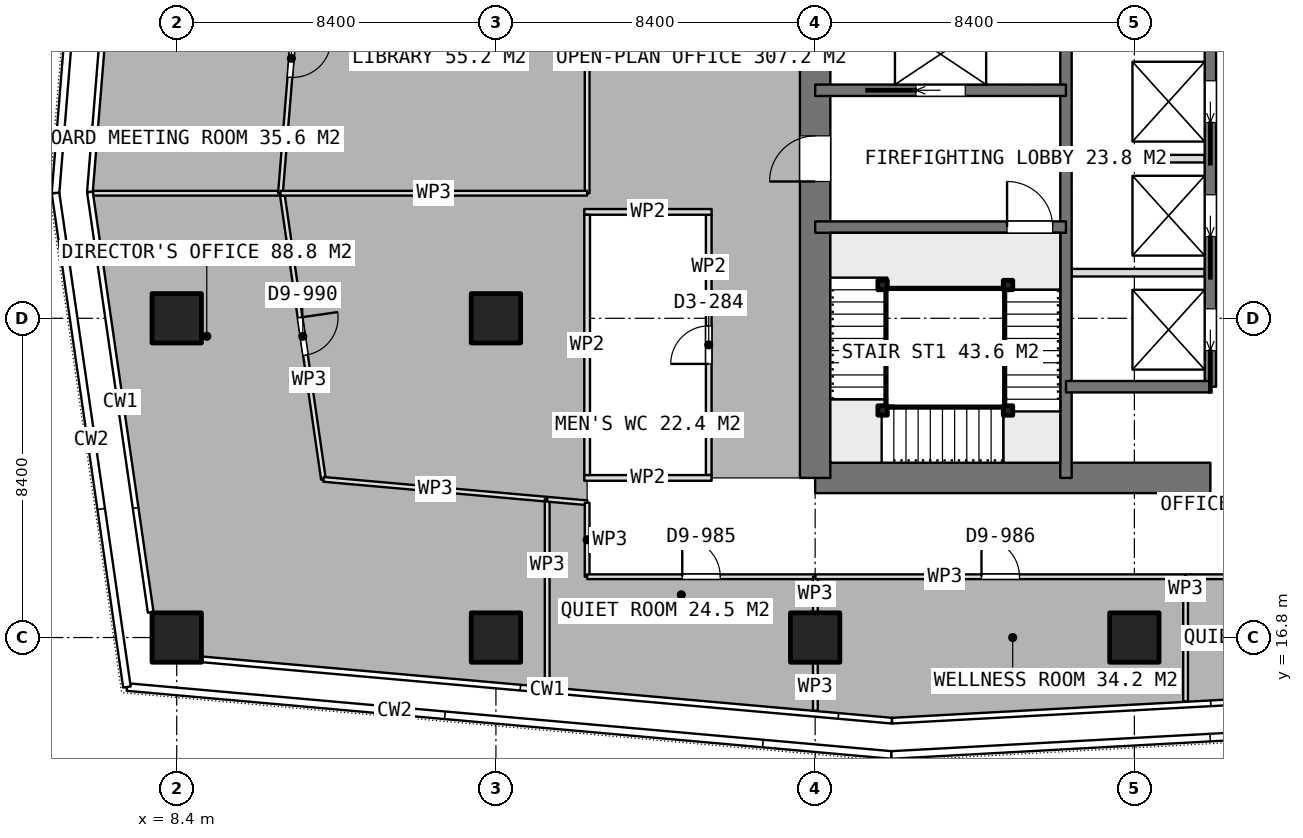
"""IFC4 building model, lengths in metres.
Left out: names, types, materials, properties, quantities, classifications, styles, units other than length and angle.
Written with IfcOpenShell. Run it as: python <this file> out.ifc"""

import sys

from ifc_helpers import new_model, si_unit, direction, frame, frame_2d, origin, origin_2d, place, context, subcontext, project, spatial, rectangle, extrude, element, fill, save


model = new_model("IFC4")
c1 = context("Model", 3, precision=1e-05, world=origin(), true_north=direction((0.0, 1.0)))
c2 = subcontext(c1, "Body", "Model", "MODEL_VIEW")
j1 = project(units=[si_unit("LENGTHUNIT", "METRE"), si_unit("PLANEANGLEUNIT", "RADIAN")], contexts=[c1])
p1 = place(None, origin())
s1 = spatial("IfcSite", under=j1, at=p1, CompositionType="ELEMENT")
p2 = place(p1, origin())
s2 = spatial("IfcBuilding", under=s1, at=p2, CompositionType="ELEMENT")
p3 = place(p2, frame((0.0, 0.0, 265.1)))
s3 = spatial("IfcBuildingStorey", under=s2, at=p3, CompositionType="ELEMENT", Elevation=265.1)
p4 = place(p3, frame((25.2, 21.0, 0.0), z_axis=(0.0, 0.0, 1.0), x_axis=(1.0, 0.0, 0.0)))
e1 = element("IfcWall", 1, at=p4, inside=s3, PredefinedType="SHEAR", context=c2, shape_type="SweptSolid", body=[
    extrude(rectangle(XDim=10.4, YDim=0.8, at=frame_2d((5.2, 0.0))), origin(), (0.0, 0.0, 1.0), 3.75),
])
p5 = place(p3, frame((25.2, 21.0, 0.0), z_axis=(0.0, 0.0, 1.0), x_axis=(0.0, 1.0, 0.0)))
e2 = element("IfcWall", 2, at=p5, inside=s3, PredefinedType="SHEAR", context=c2, shape_type="SweptSolid", body=[
    extrude(rectangle(XDim=25.2, YDim=0.8, at=frame_2d((12.6, 0.0))), origin(), (0.0, 0.0, 1.0), 3.75),
])
p6 = place(p5, frame((7.8, 0.0, 0.0)))
e3 = element("IfcOpeningElement", 3, at=p6, cuts=e2, PredefinedType="OPENING", context=c2, shape_type="SweptSolid", body=[
    extrude(rectangle(XDim=1.2, YDim=2.1, at=frame_2d((0.6, 1.05))), frame((0.0, 0.41, 0.0), z_axis=(0.0, -1.0, 0.0), x_axis=(1.0, 0.0, 0.0)), (0.0, 0.0, 1.0), 0.82),
])
p7 = place(p5, frame((14.25, 0.0, 0.0)))
e4 = element("IfcOpeningElement", 4, at=p7, cuts=e2, PredefinedType="OPENING", context=c2, shape_type="SweptSolid", body=[
    extrude(rectangle(XDim=0.9, YDim=2.1, at=frame_2d((0.45, 1.05))), frame((0.0, 0.41, 0.0), z_axis=(0.0, -1.0, 0.0), x_axis=(1.0, 0.0, 0.0)), (0.0, 0.0, 1.0), 0.82),
])
p8 = place(p5, frame((16.85, 0.0, 0.0)))
e5 = element("IfcOpeningElement", 5, at=p8, cuts=e2, PredefinedType="OPENING", context=c2, shape_type="SweptSolid", body=[
    extrude(rectangle(XDim=0.9, YDim=2.1, at=frame_2d((0.45, 1.05))), frame((0.0, 0.41, 0.0), z_axis=(0.0, -1.0, 0.0), x_axis=(1.0, 0.0, 0.0)), (0.0, 0.0, 1.0), 0.82),
])
p9 = place(p5, frame((18.95, 0.0, 0.0)))
e6 = element("IfcOpeningElement", 6, at=p9, cuts=e2, PredefinedType="OPENING", context=c2, shape_type="SweptSolid", body=[
    extrude(rectangle(XDim=1.2, YDim=2.1, at=frame_2d((0.6, 1.05))), frame((0.0, 0.41, 0.0), z_axis=(0.0, -1.0, 0.0), x_axis=(1.0, 0.0, 0.0)), (0.0, 0.0, 1.0), 0.82),
])
p10 = place(p3, frame((31.8, 21.0, 0.0), z_axis=(0.0, 0.0, 1.0), x_axis=(0.0, 1.0, 0.0)))
e7 = element("IfcWall", 7, at=p10, inside=s3, PredefinedType="SHEAR", context=c2, shape_type="SweptSolid", body=[
    extrude(rectangle(XDim=25.2, YDim=0.3, at=frame_2d((12.6, 0.0))), origin(), (0.0, 0.0, 1.0), 3.75),
])
p11 = place(p3, frame((35.6, 23.4, 0.0), z_axis=(0.0, 0.0, 1.0), x_axis=(0.0, 1.0, 0.0)))
e8 = element("IfcWall", 8, at=p11, inside=s3, PredefinedType="SHEAR", context=c2, shape_type="SweptSolid", body=[
    extrude(rectangle(XDim=18.0, YDim=0.3, at=frame_2d((9.0, 0.0))), origin(), (0.0, 0.0, 1.0), 3.75),
])
p12 = place(p11, frame((0.95, 0.0, 0.0)))
e9 = element("IfcOpeningElement", 9, at=p12, cuts=e8, PredefinedType="OPENING", context=c2, shape_type="SweptSolid", body=[
    extrude(rectangle(XDim=1.1, YDim=2.1, at=frame_2d((0.55, 1.05))), frame((0.0, 0.16, 0.0), z_axis=(0.0, -1.0, 0.0), x_axis=(1.0, 0.0, 0.0)), (0.0, 0.0, 1.0), 0.32),
])
p13 = place(p11, frame((3.95, 0.0, 0.0)))
e10 = element("IfcOpeningElement", 10, at=p13, cuts=e8, PredefinedType="OPENING", context=c2, shape_type="SweptSolid", body=[
    extrude(rectangle(XDim=1.1, YDim=2.1, at=frame_2d((0.55, 1.05))), frame((0.0, 0.16, 0.0), z_axis=(0.0, -1.0, 0.0), x_axis=(1.0, 0.0, 0.0)), (0.0, 0.0, 1.0), 0.32),
])
p14 = place(p11, frame((6.95, 0.0, 0.0)))
e11 = element("IfcOpeningElement", 11, at=p14, cuts=e8, PredefinedType="OPENING", context=c2, shape_type="SweptSolid", body=[
    extrude(rectangle(XDim=1.1, YDim=2.1, at=frame_2d((0.55, 1.05))), frame((0.0, 0.16, 0.0), z_axis=(0.0, -1.0, 0.0), x_axis=(1.0, 0.0, 0.0)), (0.0, 0.0, 1.0), 0.32),
])
p15 = place(p11, frame((9.95, 0.0, 0.0)))
e12 = element("IfcOpeningElement", 12, at=p15, cuts=e8, PredefinedType="OPENING", context=c2, shape_type="SweptSolid", body=[
    extrude(rectangle(XDim=1.1, YDim=2.1, at=frame_2d((0.55, 1.05))), frame((0.0, 0.16, 0.0), z_axis=(0.0, -1.0, 0.0), x_axis=(1.0, 0.0, 0.0)), (0.0, 0.0, 1.0), 0.32),
])
p16 = place(p11, frame((12.95, 0.0, 0.0)))
e13 = element("IfcOpeningElement", 13, at=p16, cuts=e8, PredefinedType="OPENING", context=c2, shape_type="SweptSolid", body=[
    extrude(rectangle(XDim=1.1, YDim=2.1, at=frame_2d((0.55, 1.05))), frame((0.0, 0.16, 0.0), z_axis=(0.0, -1.0, 0.0), x_axis=(1.0, 0.0, 0.0)), (0.0, 0.0, 1.0), 0.32),
])
p17 = place(p11, frame((15.95, 0.0, 0.0)))
e14 = element("IfcOpeningElement", 14, at=p17, cuts=e8, PredefinedType="OPENING", context=c2, shape_type="SweptSolid", body=[
    extrude(rectangle(XDim=1.1, YDim=2.1, at=frame_2d((0.55, 1.05))), frame((0.0, 0.16, 0.0), z_axis=(0.0, -1.0, 0.0), x_axis=(1.0, 0.0, 0.0)), (0.0, 0.0, 1.0), 0.32),
])
p18 = place(p3, frame((31.8, 23.4, 0.0), z_axis=(0.0, 0.0, 1.0), x_axis=(1.0, 0.0, 0.0)))
e15 = element("IfcWall", 15, at=p18, inside=s3, PredefinedType="SHEAR", context=c2, shape_type="SweptSolid", body=[
    extrude(rectangle(XDim=3.8, YDim=0.3, at=frame_2d((1.9, 0.0))), origin(), (0.0, 0.0, 1.0), 3.75),
])
p19 = place(p3, frame((25.2, 27.6, 0.0), z_axis=(0.0, 0.0, 1.0), x_axis=(1.0, 0.0, 0.0)))
e16 = element("IfcWall", 16, at=p19, inside=s3, PredefinedType="SHEAR", context=c2, shape_type="SweptSolid", body=[
    extrude(rectangle(XDim=6.6, YDim=0.3, at=frame_2d((3.3, 0.0))), origin(), (0.0, 0.0, 1.0), 3.75),
])
p20 = place(p19, frame((5.05, 0.0, 0.0)))
e17 = element("IfcOpeningElement", 17, at=p20, cuts=e16, PredefinedType="OPENING", context=c2, shape_type="SweptSolid", body=[
    extrude(rectangle(XDim=1.2, YDim=2.1, at=frame_2d((0.6, 1.05))), frame((0.0, 0.16, 0.0), z_axis=(0.0, -1.0, 0.0), x_axis=(1.0, 0.0, 0.0)), (0.0, 0.0, 1.0), 0.32),
])
p21 = place(p3, frame((25.2, 31.2, 0.0), z_axis=(0.0, 0.0, 1.0), x_axis=(1.0, 0.0, 0.0)))
e18 = element("IfcWall", 18, at=p21, inside=s3, PredefinedType="SHEAR", context=c2, shape_type="SweptSolid", body=[
    extrude(rectangle(XDim=6.6, YDim=0.3, at=frame_2d((3.3, 0.0))), origin(), (0.0, 0.0, 1.0), 3.75),
])
p22 = place(p21, frame((2.65, 0.0, 0.0)))
e19 = element("IfcOpeningElement", 19, at=p22, cuts=e18, PredefinedType="OPENING", context=c2, shape_type="SweptSolid", body=[
    extrude(rectangle(XDim=1.3, YDim=2.1, at=frame_2d((0.65, 1.05))), frame((0.0, 0.16, 0.0), z_axis=(0.0, -1.0, 0.0), x_axis=(1.0, 0.0, 0.0)), (0.0, 0.0, 1.0), 0.32),
])
for number, where, z_axis, x_axis in (
    (20, (8.4, 16.8, 0.0), (0.0, 0.0, 1.0), (1.0, 0.0, 0.0)),
    (21, (8.4, 25.2, 0.0), (0.0, 0.0, 1.0), (1.0, 0.0, 0.0)),
    (22, (16.8, 16.8, 0.0), (0.0, 0.0, 1.0), (1.0, 0.0, 0.0)),
    (23, (16.8, 25.2, 0.0), (0.0, 0.0, 1.0), (1.0, 0.0, 0.0)),
    (24, (25.2, 16.8, 0.0), (0.0, 0.0, 1.0), (1.0, 0.0, 0.0)),
    (25, (33.6, 16.8, 0.0), (0.0, 0.0, 1.0), (1.0, 0.0, 0.0)),
):
    element("IfcColumn", number, at=place(p3, frame(where, z_axis=z_axis, x_axis=x_axis)), inside=s3, PredefinedType="COLUMN", context=c2, shape_type="SweptSolid", body=[
        extrude(rectangle(XDim=1.3, YDim=1.3, at=origin_2d()), origin(), (0.0, 0.0, 1.0), 3.75),
    ])
for number, where, z_axis, x_axis in (
    (26, (31.95, 26.4, 0.0), (0.0, 0.0, 1.0), (1.0, 0.0, 0.0)),
    (27, (31.95, 29.4, 0.0), (0.0, 0.0, 1.0), (1.0, 0.0, 0.0)),
):
    element("IfcWall", number, at=place(p3, frame(where, z_axis=z_axis, x_axis=x_axis)), inside=s3, PredefinedType="PARTITIONING", context=c2, shape_type="SweptSolid", body=[
        extrude(rectangle(XDim=3.5, YDim=0.2, at=frame_2d((1.75, 0.0))), origin(), (0.0, 0.0, 1.0), 3.5),
    ])
for number, where, z_axis, x_axis in (
    (28, (19.125, 21.0, 0.0), (0.0, 0.0, 1.0), (1.0, 0.0, 0.0)),
    (29, (19.125, 28.0, 0.0), (0.0, 0.0, 1.0), (1.0, 0.0, 0.0)),
):
    element("IfcWall", number, at=place(p3, frame(where, z_axis=z_axis, x_axis=x_axis)), inside=s3, PredefinedType="PARTITIONING", context=c2, shape_type="SweptSolid", body=[
        extrude(rectangle(XDim=3.35, YDim=0.15, at=frame_2d((1.675, 0.0))), origin(), (0.0, 0.0, 1.0), 3.5),
    ])
p23 = place(p3, frame((19.2, 21.075, 0.0), z_axis=(0.0, 0.0, 1.0), x_axis=(0.0, 1.0, 0.0)))
e30 = element("IfcWall", 30, at=p23, inside=s3, PredefinedType="PARTITIONING", context=c2, shape_type="SweptSolid", body=[
    extrude(rectangle(XDim=6.85, YDim=0.15, at=frame_2d((3.425, 0.0))), origin(), (0.0, 0.0, 1.0), 3.5),
])
p24 = place(p3, frame((22.4, 21.075, 0.0), z_axis=(0.0, 0.0, 1.0), x_axis=(0.0, 1.0, 0.0)))
e31 = element("IfcWall", 31, at=p24, inside=s3, PredefinedType="PARTITIONING", context=c2, shape_type="SweptSolid", body=[
    extrude(rectangle(XDim=6.85, YDim=0.15, at=frame_2d((3.425, 0.0))), origin(), (0.0, 0.0, 1.0), 3.5),
])
p25 = place(p24, frame((2.925, 0.0, 0.0)))
e32 = element("IfcOpeningElement", 32, at=p25, cuts=e31, PredefinedType="OPENING", context=c2, shape_type="SweptSolid", body=[
    extrude(rectangle(XDim=1.0, YDim=2.1, at=frame_2d((0.5, 1.05))), frame((0.0, 0.085, 0.0), z_axis=(0.0, -1.0, 0.0), x_axis=(1.0, 0.0, 0.0)), (0.0, 0.0, 1.0), 0.17),
])
p26 = place(p3, frame((34.948, 15.114, 0.0), z_axis=(0.0, 0.0, 1.0), x_axis=(0.0, 1.0, 0.0)))
e33 = element("IfcWall", 33, at=p26, inside=s3, PredefinedType="PARTITIONING", context=c2, shape_type="SweptSolid", body=[
    extrude(rectangle(XDim=3.286, YDim=0.125, at=frame_2d((1.643, 0.0))), origin(), (0.0, 0.0, 1.0), 3.5),
])
p27 = place(p3, frame((34.948, 18.4, 0.0), z_axis=(0.0, 0.0, 1.0), x_axis=(1.0, 0.0, 0.0)))
e34 = element("IfcWall", 34, at=p27, inside=s3, PredefinedType="PARTITIONING", context=c2, shape_type="SweptSolid", body=[
    extrude(rectangle(XDim=7.725, YDim=0.125, at=frame_2d((3.863, 0.0))), origin(), (0.0, 0.0, 1.0), 3.5),
])
p28 = place(p27, frame((3.363, 0.0, 0.0)))
e35 = element("IfcOpeningElement", 35, at=p28, cuts=e34, PredefinedType="OPENING", context=c2, shape_type="SweptSolid", body=[
    extrude(rectangle(XDim=1.0, YDim=2.1, at=frame_2d((0.5, 1.05))), frame((0.0, 0.073, 0.0), z_axis=(0.0, -1.0, 0.0), x_axis=(1.0, 0.0, 0.0)), (0.0, 0.0, 1.0), 0.145),
])
p29 = place(p3, frame((6.201, 28.491, 0.0), z_axis=(0.0, 0.0, 1.0), x_axis=(1.0, 0.0, 0.0)))
e36 = element("IfcWall", 36, at=p29, inside=s3, PredefinedType="PARTITIONING", context=c2, shape_type="SweptSolid", body=[
    extrude(rectangle(XDim=4.929, YDim=0.125, at=frame_2d((2.464, 0.0))), origin(), (0.0, 0.0, 1.0), 3.5),
])
p30 = place(p3, frame((11.182, 28.428, 0.0), z_axis=(0.0, 0.0, 1.0), x_axis=(0.143047767318, -0.9897157856, 0.0)))
e37 = element("IfcWall", 37, at=p30, inside=s3, PredefinedType="PARTITIONING", context=c2, shape_type="SweptSolid", body=[
    extrude(rectangle(XDim=7.544, YDim=0.125, at=frame_2d((3.772, 0.0))), origin(), (0.0, 0.0, 1.0), 3.5),
])
p31 = place(p30, frame((3.241, 0.0, 0.0)))
e38 = element("IfcOpeningElement", 38, at=p31, cuts=e37, PredefinedType="OPENING", context=c2, shape_type="SweptSolid", body=[
    extrude(rectangle(XDim=1.0, YDim=2.1, at=frame_2d((0.5, 1.05))), frame((0.0, 0.073, 0.0), z_axis=(0.0, -1.0, 0.0), x_axis=(1.0, 0.0, 0.0)), (0.0, 0.0, 1.0), 0.145),
])
p32 = place(p3, frame((12.261, 20.962, 0.0), z_axis=(0.0, 0.0, 1.0), x_axis=(0.996078951833, -0.08846876124, 0.0)))
e39 = element("IfcWall", 39, at=p32, inside=s3, PredefinedType="PARTITIONING", context=c2, shape_type="SweptSolid", body=[
    extrude(rectangle(XDim=5.911, YDim=0.125, at=frame_2d((2.956, 0.0))), origin(), (0.0, 0.0, 1.0), 3.5),
])
p33 = place(p3, frame((18.149, 20.439, 0.0), z_axis=(0.0, 0.0, 1.0), x_axis=(0.0, -1.0, 0.0)))
e40 = element("IfcWall", 40, at=p33, inside=s3, PredefinedType="PARTITIONING", context=c2, shape_type="SweptSolid", body=[
    extrude(rectangle(XDim=4.939, YDim=0.125, at=frame_2d((2.469, 0.0))), origin(), (0.0, 0.0, 1.0), 3.5),
])
p34 = place(p3, frame((18.15, 20.439, 0.0), z_axis=(0.0, 0.0, 1.0), x_axis=(0.996099374617, -0.088238517026, 0.0)))
e41 = element("IfcWall", 41, at=p34, inside=s3, PredefinedType="PARTITIONING", context=c2, shape_type="SweptSolid", body=[
    extrude(rectangle(XDim=1.054, YDim=0.125, at=frame_2d((0.527, 0.0))), origin(), (0.0, 0.0, 1.0), 3.5),
])
p35 = place(p3, frame((19.2, 20.346, 0.0), z_axis=(0.0, 0.0, 1.0), x_axis=(0.0, -1.0, 0.0)))
e42 = element("IfcWall", 42, at=p35, inside=s3, PredefinedType="PARTITIONING", context=c2, shape_type="SweptSolid", body=[
    extrude(rectangle(XDim=1.946, YDim=0.125, at=frame_2d((0.973, 0.0))), origin(), (0.0, 0.0, 1.0), 3.5),
])
p36 = place(p3, frame((19.2, 18.4, 0.0), z_axis=(0.0, 0.0, 1.0), x_axis=(1.0, 0.0, 0.0)))
e43 = element("IfcWall", 43, at=p36, inside=s3, PredefinedType="PARTITIONING", context=c2, shape_type="SweptSolid", body=[
    extrude(rectangle(XDim=6.006, YDim=0.125, at=frame_2d((3.003, 0.0))), origin(), (0.0, 0.0, 1.0), 3.5),
])
p37 = place(p36, frame((2.503, 0.0, 0.0)))
e44 = element("IfcOpeningElement", 44, at=p37, cuts=e43, PredefinedType="OPENING", context=c2, shape_type="SweptSolid", body=[
    extrude(rectangle(XDim=1.0, YDim=2.1, at=frame_2d((0.5, 1.05))), frame((0.0, 0.073, 0.0), z_axis=(0.0, -1.0, 0.0), x_axis=(1.0, 0.0, 0.0)), (0.0, 0.0, 1.0), 0.145),
])
p38 = place(p3, frame((25.206, 18.4, 0.0), z_axis=(0.0, 0.0, 1.0), x_axis=(0.0, -1.0, 0.0)))
e45 = element("IfcWall", 45, at=p38, inside=s3, PredefinedType="PARTITIONING", context=c2, shape_type="SweptSolid", body=[
    extrude(rectangle(XDim=0.93, YDim=0.125, at=frame_2d((0.465, 0.0))), origin(), (0.0, 0.0, 1.0), 3.5),
])
p39 = place(p3, frame((25.206, 16.13, 0.0), z_axis=(0.0, 0.0, 1.0), x_axis=(0.0, -1.0, 0.0)))
e46 = element("IfcWall", 46, at=p39, inside=s3, PredefinedType="PARTITIONING", context=c2, shape_type="SweptSolid", body=[
    extrude(rectangle(XDim=1.258, YDim=0.125, at=frame_2d((0.629, 0.0))), origin(), (0.0, 0.0, 1.0), 3.5),
])
p40 = place(p3, frame((25.207, 18.4, 0.0), z_axis=(0.0, 0.0, 1.0), x_axis=(1.0, 0.0, 0.0)))
e47 = element("IfcWall", 47, at=p40, inside=s3, PredefinedType="PARTITIONING", context=c2, shape_type="SweptSolid", body=[
    extrude(rectangle(XDim=9.74, YDim=0.125, at=frame_2d((4.87, 0.0))), origin(), (0.0, 0.0, 1.0), 3.5),
])
p41 = place(p40, frame((4.37, 0.0, 0.0)))
e48 = element("IfcOpeningElement", 48, at=p41, cuts=e47, PredefinedType="OPENING", context=c2, shape_type="SweptSolid", body=[
    extrude(rectangle(XDim=1.0, YDim=2.1, at=frame_2d((0.5, 1.05))), frame((0.0, 0.073, 0.0), z_axis=(0.0, -1.0, 0.0), x_axis=(1.0, 0.0, 0.0)), (0.0, 0.0, 1.0), 0.145),
])
p42 = place(p3, frame((11.707, 35.59, 0.0), z_axis=(0.0, 0.0, 1.0), x_axis=(-0.081031230988, -0.996711562893, 0.0)))
e49 = element("IfcWall", 49, at=p42, inside=s3, PredefinedType="PARTITIONING", context=c2, shape_type="SweptSolid", body=[
    extrude(rectangle(XDim=7.123, YDim=0.125, at=frame_2d((3.561, 0.0))), origin(), (0.0, 0.0, 1.0), 3.5),
])
p43 = place(p42, frame((3.061, 0.0, 0.0)))
e50 = element("IfcOpeningElement", 50, at=p43, cuts=e49, PredefinedType="OPENING", context=c2, shape_type="SweptSolid", body=[
    extrude(rectangle(XDim=1.0, YDim=2.1, at=frame_2d((0.5, 1.05))), frame((0.0, 0.073, 0.0), z_axis=(0.0, -1.0, 0.0), x_axis=(1.0, 0.0, 0.0)), (0.0, 0.0, 1.0), 0.145),
])
p44 = place(p3, frame((19.2, 35.59, 0.0), z_axis=(0.0, 0.0, 1.0), x_axis=(0.0, -1.0, 0.0)))
e51 = element("IfcWall", 51, at=p44, inside=s3, PredefinedType="PARTITIONING", context=c2, shape_type="SweptSolid", body=[
    extrude(rectangle(XDim=7.099, YDim=0.125, at=frame_2d((3.55, 0.0))), origin(), (0.0, 0.0, 1.0), 3.5),
])
p45 = place(p3, frame((19.2, 28.491, 0.0), z_axis=(0.0, 0.0, 1.0), x_axis=(-1.0, 0.0, 0.0)))
e52 = element("IfcWall", 52, at=p45, inside=s3, PredefinedType="PARTITIONING", context=c2, shape_type="SweptSolid", body=[
    extrude(rectangle(XDim=8.07, YDim=0.125, at=frame_2d((4.035, 0.0))), origin(), (0.0, 0.0, 1.0), 3.5),
])
for number, where, z_axis, x_axis in (
    (53, (30.275, 26.075, 0.0), (0.0, 0.0, 1.0), (1.0, 0.0, 0.0)),
    (54, (30.275, 22.775, 0.0), (0.0, 0.0, 1.0), (1.0, 0.0, 0.0)),
    (55, (26.975, 22.775, 0.0), (0.0, 0.0, 1.0), (1.0, 0.0, 0.0)),
    (56, (26.975, 26.075, 0.0), (0.0, 0.0, 1.0), (1.0, 0.0, 0.0)),
):
    element("IfcColumn", number, at=place(p3, frame(where, z_axis=z_axis, x_axis=x_axis)), inside=s3, PredefinedType="COLUMN", context=c2, shape_type="SweptSolid", body=[
        extrude(rectangle(XDim=0.25, YDim=0.25, at=origin_2d()), origin(), (0.0, 0.0, 1.0), 3.75),
    ])
p46 = place(p6, origin())
e57 = element("IfcDoor", 57, at=p46, inside=s3, OperationType="SINGLE_SWING_LEFT", PredefinedType="DOOR", context=c2, shape_type="SweptSolid", body=[
    extrude(rectangle(XDim=1.2, YDim=2.1, at=frame_2d((0.6, 1.05))), frame((0.0, 0.025, 0.0), z_axis=(0.0, -1.0, 0.0), x_axis=(1.0, 0.0, 0.0)), (0.0, 0.0, 1.0), 0.05),
])
fill(e3, e57)
p47 = place(p12, origin())
e58 = element("IfcDoor", 58, at=p47, inside=s3, OperationType="SLIDING_TO_LEFT", PredefinedType="USERDEFINED", context=c2, shape_type="SweptSolid", body=[
    extrude(rectangle(XDim=1.1, YDim=2.1, at=frame_2d((0.55, 1.05))), frame((0.0, 0.025, 0.0), z_axis=(0.0, -1.0, 0.0), x_axis=(1.0, 0.0, 0.0)), (0.0, 0.0, 1.0), 0.05),
])
fill(e9, e58)
p48 = place(p13, origin())
e59 = element("IfcDoor", 59, at=p48, inside=s3, OperationType="SLIDING_TO_LEFT", PredefinedType="USERDEFINED", context=c2, shape_type="SweptSolid", body=[
    extrude(rectangle(XDim=1.1, YDim=2.1, at=frame_2d((0.55, 1.05))), frame((0.0, 0.025, 0.0), z_axis=(0.0, -1.0, 0.0), x_axis=(1.0, 0.0, 0.0)), (0.0, 0.0, 1.0), 0.05),
])
fill(e10, e59)
p49 = place(p14, origin())
e60 = element("IfcDoor", 60, at=p49, inside=s3, OperationType="SLIDING_TO_LEFT", PredefinedType="USERDEFINED", context=c2, shape_type="SweptSolid", body=[
    extrude(rectangle(XDim=1.1, YDim=2.1, at=frame_2d((0.55, 1.05))), frame((0.0, 0.025, 0.0), z_axis=(0.0, -1.0, 0.0), x_axis=(1.0, 0.0, 0.0)), (0.0, 0.0, 1.0), 0.05),
])
fill(e11, e60)
p50 = place(p22, origin())
e61 = element("IfcDoor", 61, at=p50, inside=s3, OperationType="SLIDING_TO_LEFT", PredefinedType="USERDEFINED", context=c2, shape_type="SweptSolid", body=[
    extrude(rectangle(XDim=1.3, YDim=2.1, at=frame_2d((0.65, 1.05))), frame((0.0, 0.025, 0.0), z_axis=(0.0, -1.0, 0.0), x_axis=(1.0, 0.0, 0.0)), (0.0, 0.0, 1.0), 0.05),
])
fill(e19, e61)
p51 = place(p25, origin())
e62 = element("IfcDoor", 62, at=p51, inside=s3, OperationType="SINGLE_SWING_LEFT", PredefinedType="DOOR", context=c2, shape_type="SweptSolid", body=[
    extrude(rectangle(XDim=1.0, YDim=2.1, at=frame_2d((0.5, 1.05))), frame((0.0, 0.025, 0.0), z_axis=(0.0, -1.0, 0.0), x_axis=(1.0, 0.0, 0.0)), (0.0, 0.0, 1.0), 0.05),
])
fill(e32, e62)
p52 = place(p31, origin())
e63 = element("IfcDoor", 63, at=p52, inside=s3, OperationType="SINGLE_SWING_LEFT", PredefinedType="DOOR", context=c2, shape_type="SweptSolid", body=[
    extrude(rectangle(XDim=1.0, YDim=2.1, at=frame_2d((0.5, 1.05))), frame((0.0, 0.025, 0.0), z_axis=(0.0, -1.0, 0.0), x_axis=(1.0, 0.0, 0.0)), (0.0, 0.0, 1.0), 0.05),
])
fill(e38, e63)
p53 = place(p37, origin())
e64 = element("IfcDoor", 64, at=p53, inside=s3, OperationType="SINGLE_SWING_LEFT", PredefinedType="DOOR", context=c2, shape_type="SweptSolid", body=[
    extrude(rectangle(XDim=1.0, YDim=2.1, at=frame_2d((0.5, 1.05))), frame((0.0, 0.025, 0.0), z_axis=(0.0, -1.0, 0.0), x_axis=(1.0, 0.0, 0.0)), (0.0, 0.0, 1.0), 0.05),
])
fill(e44, e64)
p54 = place(p41, origin())
e65 = element("IfcDoor", 65, at=p54, inside=s3, OperationType="SINGLE_SWING_LEFT", PredefinedType="DOOR", context=c2, shape_type="SweptSolid", body=[
    extrude(rectangle(XDim=1.0, YDim=2.1, at=frame_2d((0.5, 1.05))), frame((0.0, 0.025, 0.0), z_axis=(0.0, -1.0, 0.0), x_axis=(1.0, 0.0, 0.0)), (0.0, 0.0, 1.0), 0.05),
])
fill(e48, e65)
p55 = place(p43, origin())
e66 = element("IfcDoor", 66, at=p55, inside=s3, OperationType="SINGLE_SWING_LEFT", PredefinedType="DOOR", context=c2, shape_type="SweptSolid", body=[
    extrude(rectangle(XDim=1.0, YDim=2.1, at=frame_2d((0.5, 1.05))), frame((0.0, 0.025, 0.0), z_axis=(0.0, -1.0, 0.0), x_axis=(1.0, 0.0, 0.0)), (0.0, 0.0, 1.0), 0.05),
])
fill(e50, e66)
p56 = place(p20, origin())
e67 = element("IfcDoor", 67, at=p56, inside=s3, OperationType="SINGLE_SWING_RIGHT", PredefinedType="DOOR", context=c2, shape_type="SweptSolid", body=[
    extrude(rectangle(XDim=1.2, YDim=2.1, at=frame_2d((0.6, 1.05))), frame((0.0, 0.025, 0.0), z_axis=(0.0, -1.0, 0.0), x_axis=(1.0, 0.0, 0.0)), (0.0, 0.0, 1.0), 0.05),
])
fill(e17, e67)
save(model, sys.argv[1])
